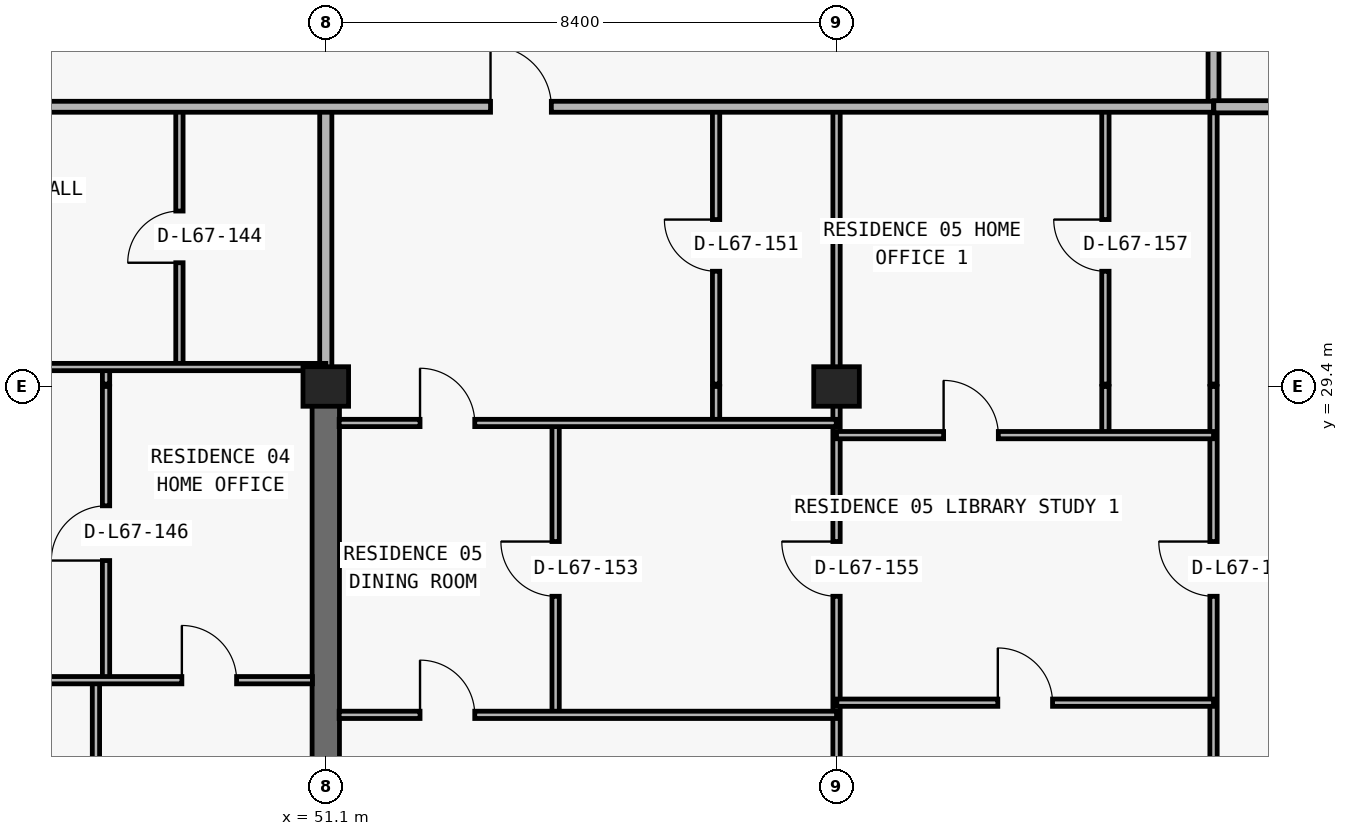
"""IFC4 building model, lengths in metres.
Left out: names, types, materials, properties, quantities, classifications, styles, units other than length and angle.
Written with IfcOpenShell. Run it as: python <this file> out.ifc"""

import sys

from ifc_helpers import new_model, si_unit, direction, frame, frame_2d, origin, origin_2d, place, context, subcontext, project, spatial, rectangle, extrude, element, fill, save


model = new_model("IFC4")
c1 = context("Model", 3, precision=1e-05, world=origin(), true_north=direction((0.0, 1.0)))
c2 = subcontext(c1, "Body", "Model", "MODEL_VIEW")
j1 = project(units=[si_unit("LENGTHUNIT", "METRE"), si_unit("PLANEANGLEUNIT", "RADIAN")], contexts=[c1])
p1 = place(None, origin())
s1 = spatial("IfcSite", under=j1, at=p1, CompositionType="ELEMENT")
p2 = place(p1, origin())
s2 = spatial("IfcBuilding", under=s1, at=p2, CompositionType="ELEMENT")
p3 = place(p2, frame((0.0, 0.0, 239.7)))
s3 = spatial("IfcBuildingStorey", under=s2, at=p3, CompositionType="ELEMENT", Elevation=239.7)
for number, where, z_axis, x_axis in (
    (1, (51.1, 29.4, 0.0), (0.0, 0.0, 1.0), (1.0, 0.0, 0.0)),
    (2, (59.5, 29.4, 0.0), (0.0, 0.0, 1.0), (1.0, 0.0, 0.0)),
):
    element("IfcColumn", number, at=place(p3, frame(where, z_axis=z_axis, x_axis=x_axis)), inside=s3, PredefinedType="COLUMN", context=c2, shape_type="SweptSolid", body=[
        extrude(rectangle(XDim=0.75, YDim=0.65, at=origin_2d()), origin(), (0.0, 0.0, 1.0), 3.05),
    ])
p4 = place(p3, frame((51.1, 20.8, 0.0), z_axis=(0.0, 0.0, 1.0), x_axis=(0.0, 1.0, 0.0)))
e3 = element("IfcWall", 3, at=p4, inside=s3, PredefinedType="SHEAR", context=c2, shape_type="SweptSolid", body=[
    extrude(rectangle(XDim=8.6, YDim=0.45, at=frame_2d((4.3, 0.0))), origin(), (0.0, 0.0, 1.0), 3.05),
])
p5 = place(p3, frame((47.32, 13.34, 0.0), z_axis=(0.0, 0.0, 1.0), x_axis=(0.0, 1.0, 0.0)))
e4 = element("IfcWall", 4, at=p5, inside=s3, PredefinedType="PARTITIONING", context=c2, shape_type="SweptSolid", body=[
    extrude(rectangle(XDim=11.23, YDim=0.12, at=frame_2d((5.615, 0.0))), origin(), (0.0, 0.0, 1.0), 3.05),
])
p6 = place(p3, frame((47.486, 24.575, 0.0), z_axis=(0.0, 0.0, 1.0), x_axis=(0.0, 1.0, 0.0)))
e5 = element("IfcWall", 5, at=p6, inside=s3, PredefinedType="PARTITIONING", context=c2, shape_type="SweptSolid", body=[
    extrude(rectangle(XDim=4.825, YDim=0.12, at=frame_2d((2.413, 0.0))), origin(), (0.0, 0.0, 1.0), 3.05),
])
p7 = place(p6, frame((1.962, 0.0, 0.0)))
e6 = element("IfcOpeningElement", 6, at=p7, cuts=e5, PredefinedType="OPENING", context=c2, shape_type="SweptSolid", body=[
    extrude(rectangle(XDim=0.9, YDim=2.15, at=frame_2d((0.45, 1.075))), frame((0.0, 0.07, 0.0), z_axis=(0.0, -1.0, 0.0), x_axis=(1.0, 0.0, 0.0)), (0.0, 0.0, 1.0), 0.14),
])
p8 = place(p3, frame((47.486, 29.44, 0.0), z_axis=(0.0, 0.0, 1.0), x_axis=(0.0, 1.0, 0.0)))
e7 = element("IfcWall", 7, at=p8, inside=s3, PredefinedType="PARTITIONING", context=c2, shape_type="SweptSolid", body=[
    extrude(rectangle(XDim=0.28, YDim=0.12, at=frame_2d((0.14, 0.0))), origin(), (0.0, 0.0, 1.0), 3.05),
])
p9 = place(p3, frame((48.693, 29.72, 0.0), z_axis=(0.0, 0.0, 1.0), x_axis=(0.0, 1.0, 0.0)))
e8 = element("IfcWall", 8, at=p9, inside=s3, PredefinedType="PARTITIONING", context=c2, shape_type="SweptSolid", body=[
    extrude(rectangle(XDim=4.28, YDim=0.12, at=frame_2d((2.14, 0.0))), origin(), (0.0, 0.0, 1.0), 3.05),
])
p10 = place(p9, frame((1.715, 0.0, 0.0)))
e9 = element("IfcOpeningElement", 9, at=p10, cuts=e8, PredefinedType="OPENING", context=c2, shape_type="SweptSolid", body=[
    extrude(rectangle(XDim=0.85, YDim=2.1, at=frame_2d((0.425, 1.05))), frame((0.0, 0.07, 0.0), z_axis=(0.0, -1.0, 0.0), x_axis=(1.0, 0.0, 0.0)), (0.0, 0.0, 1.0), 0.14),
])
p11 = place(p3, frame((51.1, 29.44, 0.0), z_axis=(0.0, 0.0, 1.0), x_axis=(0.0, 1.0, 0.0)))
e10 = element("IfcWall", 10, at=p11, inside=s3, PredefinedType="PARTITIONING", context=c2, shape_type="SweptSolid", body=[
    extrude(rectangle(XDim=4.56, YDim=0.2, at=frame_2d((2.28, 0.0))), origin(), (0.0, 0.0, 1.0), 2.335),
])
p12 = place(p3, frame((54.88, 24.0, 0.0), z_axis=(0.0, 0.0, 1.0), x_axis=(0.0, 1.0, 0.0)))
e11 = element("IfcWall", 11, at=p12, inside=s3, PredefinedType="PARTITIONING", context=c2, shape_type="SweptSolid", body=[
    extrude(rectangle(XDim=4.8, YDim=0.12, at=frame_2d((2.4, 0.0))), origin(), (0.0, 0.0, 1.0), 3.05),
])
p13 = place(p12, frame((1.95, 0.0, 0.0)))
e12 = element("IfcOpeningElement", 12, at=p13, cuts=e11, PredefinedType="OPENING", context=c2, shape_type="SweptSolid", body=[
    extrude(rectangle(XDim=0.9, YDim=2.15, at=frame_2d((0.45, 1.075))), frame((0.0, 0.07, 0.0), z_axis=(0.0, -1.0, 0.0), x_axis=(1.0, 0.0, 0.0)), (0.0, 0.0, 1.0), 0.14),
])
p14 = place(p3, frame((57.519, 28.8, 0.0), z_axis=(0.0, 0.0, 1.0), x_axis=(0.0, 1.0, 0.0)))
e13 = element("IfcWall", 13, at=p14, inside=s3, PredefinedType="PARTITIONING", context=c2, shape_type="SweptSolid", body=[
    extrude(rectangle(XDim=0.6, YDim=0.12, at=frame_2d((0.3, 0.0))), origin(), (0.0, 0.0, 1.0), 3.05),
])
p15 = place(p3, frame((57.519, 29.44, 0.0), z_axis=(0.0, 0.0, 1.0), x_axis=(0.0, 1.0, 0.0)))
e14 = element("IfcWall", 14, at=p15, inside=s3, PredefinedType="PARTITIONING", context=c2, shape_type="SweptSolid", body=[
    extrude(rectangle(XDim=4.56, YDim=0.12, at=frame_2d((2.28, 0.0))), origin(), (0.0, 0.0, 1.0), 3.05),
])
p16 = place(p15, frame((1.855, 0.0, 0.0)))
e15 = element("IfcOpeningElement", 15, at=p16, cuts=e14, PredefinedType="OPENING", context=c2, shape_type="SweptSolid", body=[
    extrude(rectangle(XDim=0.85, YDim=2.1, at=frame_2d((0.425, 1.05))), frame((0.0, 0.07, 0.0), z_axis=(0.0, -1.0, 0.0), x_axis=(1.0, 0.0, 0.0)), (0.0, 0.0, 1.0), 0.14),
])
p17 = place(p3, frame((59.5, 13.34, 0.0), z_axis=(0.0, 0.0, 1.0), x_axis=(0.0, 1.0, 0.0)))
e16 = element("IfcWall", 16, at=p17, inside=s3, PredefinedType="PARTITIONING", context=c2, shape_type="SweptSolid", body=[
    extrude(rectangle(XDim=16.06, YDim=0.12, at=frame_2d((8.03, 0.0))), origin(), (0.0, 0.0, 1.0), 2.263),
])
p18 = place(p17, frame((12.61, 0.0, 0.0)))
e17 = element("IfcOpeningElement", 17, at=p18, cuts=e16, PredefinedType="OPENING", context=c2, shape_type="SweptSolid", body=[
    extrude(rectangle(XDim=0.9, YDim=2.15, at=frame_2d((0.45, 1.075))), frame((0.0, 0.07, 0.0), z_axis=(0.0, -1.0, 0.0), x_axis=(1.0, 0.0, 0.0)), (0.0, 0.0, 1.0), 0.14),
])
p19 = place(p3, frame((59.5, 29.44, 0.0), z_axis=(0.0, 0.0, 1.0), x_axis=(0.0, 1.0, 0.0)))
e18 = element("IfcWall", 18, at=p19, inside=s3, PredefinedType="PARTITIONING", context=c2, shape_type="SweptSolid", body=[
    extrude(rectangle(XDim=4.56, YDim=0.12, at=frame_2d((2.28, 0.0))), origin(), (0.0, 0.0, 1.0), 2.263),
])
p20 = place(p3, frame((63.922, 28.6, 0.0), z_axis=(0.0, 0.0, 1.0), x_axis=(0.0, 1.0, 0.0)))
e19 = element("IfcWall", 19, at=p20, inside=s3, PredefinedType="PARTITIONING", context=c2, shape_type="SweptSolid", body=[
    extrude(rectangle(XDim=0.8, YDim=0.12, at=frame_2d((0.4, 0.0))), origin(), (0.0, 0.0, 1.0), 2.629),
])
p21 = place(p3, frame((63.922, 29.44, 0.0), z_axis=(0.0, 0.0, 1.0), x_axis=(0.0, 1.0, 0.0)))
e20 = element("IfcWall", 20, at=p21, inside=s3, PredefinedType="PARTITIONING", context=c2, shape_type="SweptSolid", body=[
    extrude(rectangle(XDim=4.56, YDim=0.12, at=frame_2d((2.28, 0.0))), origin(), (0.0, 0.0, 1.0), 2.629),
])
p22 = place(p21, frame((1.855, 0.0, 0.0)))
e21 = element("IfcOpeningElement", 21, at=p22, cuts=e20, PredefinedType="OPENING", context=c2, shape_type="SweptSolid", body=[
    extrude(rectangle(XDim=0.85, YDim=2.1, at=frame_2d((0.425, 1.05))), frame((0.0, 0.07, 0.0), z_axis=(0.0, -1.0, 0.0), x_axis=(1.0, 0.0, 0.0)), (0.0, 0.0, 1.0), 0.14),
])
p23 = place(p3, frame((65.7, 13.42, 0.0), z_axis=(0.0, 0.0, 1.0), x_axis=(0.0, 1.0, 0.0)))
e22 = element("IfcWall", 22, at=p23, inside=s3, PredefinedType="PARTITIONING", context=c2, shape_type="SweptSolid", body=[
    extrude(rectangle(XDim=15.98, YDim=0.12, at=frame_2d((7.99, 0.0))), origin(), (0.0, 0.0, 1.0), 3.05),
])
p24 = place(p23, frame((12.53, 0.0, 0.0)))
e23 = element("IfcOpeningElement", 23, at=p24, cuts=e22, PredefinedType="OPENING", context=c2, shape_type="SweptSolid", body=[
    extrude(rectangle(XDim=0.9, YDim=2.15, at=frame_2d((0.45, 1.075))), frame((0.0, 0.07, 0.0), z_axis=(0.0, -1.0, 0.0), x_axis=(1.0, 0.0, 0.0)), (0.0, 0.0, 1.0), 0.14),
])
p25 = place(p3, frame((65.7, 29.44, 0.0), z_axis=(0.0, 0.0, 1.0), x_axis=(0.0, 1.0, 0.0)))
e24 = element("IfcWall", 24, at=p25, inside=s3, PredefinedType="PARTITIONING", context=c2, shape_type="SweptSolid", body=[
    extrude(rectangle(XDim=4.56, YDim=0.12, at=frame_2d((2.28, 0.0))), origin(), (0.0, 0.0, 1.0), 3.05),
])
p26 = place(p3, frame((65.7, 34.005, 0.0), z_axis=(0.0, 0.0, 1.0), x_axis=(0.0, 1.0, 0.0)))
e25 = element("IfcWall", 25, at=p26, inside=s3, PredefinedType="PARTITIONING", context=c2, shape_type="SweptSolid", body=[
    extrude(rectangle(XDim=2.995, YDim=0.18, at=frame_2d((1.498, 0.0))), origin(), (0.0, 0.0, 1.0), 3.05),
])
p27 = place(p3, frame((51.32, 24.0, 0.0), z_axis=(0.0, 0.0, 1.0), x_axis=(1.0, 0.0, 0.0)))
e26 = element("IfcWall", 26, at=p27, inside=s3, PredefinedType="PARTITIONING", context=c2, shape_type="SweptSolid", body=[
    extrude(rectangle(XDim=8.18, YDim=0.12, at=frame_2d((4.09, 0.0))), origin(), (0.0, 0.0, 1.0), 3.05),
])
p28 = place(p27, frame((1.33, 0.0, 0.0)))
e27 = element("IfcOpeningElement", 27, at=p28, cuts=e26, PredefinedType="OPENING", context=c2, shape_type="SweptSolid", body=[
    extrude(rectangle(XDim=0.9, YDim=2.15, at=frame_2d((0.45, 1.075))), frame((0.0, 0.07, 0.0), z_axis=(0.0, -1.0, 0.0), x_axis=(1.0, 0.0, 0.0)), (0.0, 0.0, 1.0), 0.14),
])
p29 = place(p3, frame((59.505, 24.2, 0.0), z_axis=(0.0, 0.0, 1.0), x_axis=(1.0, 0.0, 0.0)))
e28 = element("IfcWall", 28, at=p29, inside=s3, PredefinedType="PARTITIONING", context=c2, shape_type="SweptSolid", body=[
    extrude(rectangle(XDim=6.195, YDim=0.12, at=frame_2d((3.098, 0.0))), origin(), (0.0, 0.0, 1.0), 3.05),
])
p30 = place(p29, frame((2.647, 0.0, 0.0)))
e29 = element("IfcOpeningElement", 29, at=p30, cuts=e28, PredefinedType="OPENING", context=c2, shape_type="SweptSolid", body=[
    extrude(rectangle(XDim=0.9, YDim=2.15, at=frame_2d((0.45, 1.075))), frame((0.0, 0.07, 0.0), z_axis=(0.0, -1.0, 0.0), x_axis=(1.0, 0.0, 0.0)), (0.0, 0.0, 1.0), 0.14),
])
p31 = place(p3, frame((42.7, 24.57, 0.0), z_axis=(0.0, 0.0, 1.0), x_axis=(1.0, 0.0, 0.0)))
e30 = element("IfcWall", 30, at=p31, inside=s3, PredefinedType="PARTITIONING", context=c2, shape_type="SweptSolid", body=[
    extrude(rectangle(XDim=8.18, YDim=0.12, at=frame_2d((4.09, 0.0))), origin(), (0.0, 0.0, 1.0), 3.05),
])
p32 = place(p31, frame((1.86, 0.0, 0.0)))
e31 = element("IfcOpeningElement", 31, at=p32, cuts=e30, PredefinedType="OPENING", context=c2, shape_type="SweptSolid", body=[
    extrude(rectangle(XDim=0.9, YDim=2.15, at=frame_2d((0.45, 1.075))), frame((0.0, 0.07, 0.0), z_axis=(0.0, -1.0, 0.0), x_axis=(1.0, 0.0, 0.0)), (0.0, 0.0, 1.0), 0.14),
])
p33 = place(p31, frame((6.033, 0.0, 0.0)))
e32 = element("IfcOpeningElement", 32, at=p33, cuts=e30, PredefinedType="OPENING", context=c2, shape_type="SweptSolid", body=[
    extrude(rectangle(XDim=0.9, YDim=2.15, at=frame_2d((0.45, 1.075))), frame((0.0, 0.07, 0.0), z_axis=(0.0, -1.0, 0.0), x_axis=(1.0, 0.0, 0.0)), (0.0, 0.0, 1.0), 0.14),
])
p34 = place(p3, frame((59.5, 28.6, 0.0), z_axis=(0.0, 0.0, 1.0), x_axis=(1.0, 0.0, 0.0)))
e33 = element("IfcWall", 33, at=p34, inside=s3, PredefinedType="PARTITIONING", context=c2, shape_type="SweptSolid", body=[
    extrude(rectangle(XDim=6.2, YDim=0.12, at=frame_2d((3.1, 0.0))), origin(), (0.0, 0.0, 1.0), 3.05),
])
p35 = place(p34, frame((1.761, 0.0, 0.0)))
e34 = element("IfcOpeningElement", 34, at=p35, cuts=e33, PredefinedType="OPENING", context=c2, shape_type="SweptSolid", body=[
    extrude(rectangle(XDim=0.9, YDim=2.15, at=frame_2d((0.45, 1.075))), frame((0.0, 0.07, 0.0), z_axis=(0.0, -1.0, 0.0), x_axis=(1.0, 0.0, 0.0)), (0.0, 0.0, 1.0), 0.14),
])
p36 = place(p3, frame((51.32, 28.8, 0.0), z_axis=(0.0, 0.0, 1.0), x_axis=(1.0, 0.0, 0.0)))
e35 = element("IfcWall", 35, at=p36, inside=s3, PredefinedType="PARTITIONING", context=c2, shape_type="SweptSolid", body=[
    extrude(rectangle(XDim=8.175, YDim=0.12, at=frame_2d((4.087, 0.0))), origin(), (0.0, 0.0, 1.0), 3.05),
])
p37 = place(p36, frame((1.33, 0.0, 0.0)))
e36 = element("IfcOpeningElement", 36, at=p37, cuts=e35, PredefinedType="OPENING", context=c2, shape_type="SweptSolid", body=[
    extrude(rectangle(XDim=0.9, YDim=2.15, at=frame_2d((0.45, 1.075))), frame((0.0, 0.07, 0.0), z_axis=(0.0, -1.0, 0.0), x_axis=(1.0, 0.0, 0.0)), (0.0, 0.0, 1.0), 0.14),
])
p38 = place(p3, frame((42.7, 29.72, 0.0), z_axis=(0.0, 0.0, 1.0), x_axis=(1.0, 0.0, 0.0)))
e37 = element("IfcWall", 37, at=p38, inside=s3, PredefinedType="PARTITIONING", context=c2, shape_type="SweptSolid", body=[
    extrude(rectangle(XDim=8.4, YDim=0.12, at=frame_2d((4.2, 0.0))), origin(), (0.0, 0.0, 1.0), 2.263),
])
p39 = place(p38, frame((1.943, 0.0, 0.0)))
e38 = element("IfcOpeningElement", 38, at=p39, cuts=e37, PredefinedType="OPENING", context=c2, shape_type="SweptSolid", body=[
    extrude(rectangle(XDim=0.9, YDim=2.15, at=frame_2d((0.45, 1.075))), frame((0.0, 0.07, 0.0), z_axis=(0.0, -1.0, 0.0), x_axis=(1.0, 0.0, 0.0)), (0.0, 0.0, 1.0), 0.14),
])
p40 = place(p3, frame((12.105, 34.0, 0.0), z_axis=(0.0, 0.0, 1.0), x_axis=(1.0, 0.0, 0.0)))
e39 = element("IfcWall", 39, at=p40, inside=s3, PredefinedType="PARTITIONING", context=c2, shape_type="SweptSolid", body=[
    extrude(rectangle(XDim=53.595, YDim=0.18, at=frame_2d((26.797, 0.0))), origin(), (0.0, 0.0, 1.0), 3.05),
])
p41 = place(p40, frame((1.607, 0.0, 0.0)))
e40 = element("IfcOpeningElement", 40, at=p41, cuts=e39, PredefinedType="OPENING", context=c2, shape_type="SweptSolid", body=[
    extrude(rectangle(XDim=1.0, YDim=2.2, at=frame_2d((0.5, 1.1))), frame((0.0, 0.1, 0.0), z_axis=(0.0, -1.0, 0.0), x_axis=(1.0, 0.0, 0.0)), (0.0, 0.0, 1.0), 0.2),
])
p42 = place(p40, frame((17.057, 0.0, 0.0)))
e41 = element("IfcOpeningElement", 41, at=p42, cuts=e39, PredefinedType="OPENING", context=c2, shape_type="SweptSolid", body=[
    extrude(rectangle(XDim=1.0, YDim=2.2, at=frame_2d((0.5, 1.1))), frame((0.0, 0.1, 0.0), z_axis=(0.0, -1.0, 0.0), x_axis=(1.0, 0.0, 0.0)), (0.0, 0.0, 1.0), 0.2),
])
p43 = place(p40, frame((25.242, 0.0, 0.0)))
e42 = element("IfcOpeningElement", 42, at=p43, cuts=e39, PredefinedType="OPENING", context=c2, shape_type="SweptSolid", body=[
    extrude(rectangle(XDim=1.0, YDim=2.2, at=frame_2d((0.5, 1.1))), frame((0.0, 0.1, 0.0), z_axis=(0.0, -1.0, 0.0), x_axis=(1.0, 0.0, 0.0)), (0.0, 0.0, 1.0), 0.2),
])
p44 = place(p40, frame((33.092, 0.0, 0.0)))
e43 = element("IfcOpeningElement", 43, at=p44, cuts=e39, PredefinedType="OPENING", context=c2, shape_type="SweptSolid", body=[
    extrude(rectangle(XDim=1.0, YDim=2.2, at=frame_2d((0.5, 1.1))), frame((0.0, 0.1, 0.0), z_axis=(0.0, -1.0, 0.0), x_axis=(1.0, 0.0, 0.0)), (0.0, 0.0, 1.0), 0.2),
])
p45 = place(p40, frame((41.705, 0.0, 0.0)))
e44 = element("IfcOpeningElement", 44, at=p45, cuts=e39, PredefinedType="OPENING", context=c2, shape_type="SweptSolid", body=[
    extrude(rectangle(XDim=1.0, YDim=2.2, at=frame_2d((0.5, 1.1))), frame((0.0, 0.1, 0.0), z_axis=(0.0, -1.0, 0.0), x_axis=(1.0, 0.0, 0.0)), (0.0, 0.0, 1.0), 0.2),
])
p46 = place(p3, frame((65.705, 34.0, 0.0), z_axis=(0.0, 0.0, 1.0), x_axis=(1.0, 0.0, 0.0)))
e45 = element("IfcWall", 45, at=p46, inside=s3, PredefinedType="PARTITIONING", context=c2, shape_type="SweptSolid", body=[
    extrude(rectangle(XDim=3.7, YDim=0.2, at=frame_2d((1.85, 0.0))), origin(), (0.0, 0.0, 1.0), 3.05),
])
p47 = place(p10, origin())
e46 = element("IfcDoor", 46, at=p47, inside=s3, OperationType="SINGLE_SWING_LEFT", PredefinedType="DOOR", context=c2, shape_type="SweptSolid", body=[
    extrude(rectangle(XDim=0.85, YDim=2.1, at=frame_2d((0.425, 1.05))), frame((0.0, 0.025, 0.0), z_axis=(0.0, -1.0, 0.0), x_axis=(1.0, 0.0, 0.0)), (0.0, 0.0, 1.0), 0.05),
])
fill(e9, e46)
p48 = place(p7, origin())
e47 = element("IfcDoor", 47, at=p48, inside=s3, OperationType="SINGLE_SWING_LEFT", PredefinedType="DOOR", context=c2, shape_type="SweptSolid", body=[
    extrude(rectangle(XDim=0.9, YDim=2.15, at=frame_2d((0.45, 1.075))), frame((0.0, 0.025, 0.0), z_axis=(0.0, -1.0, 0.0), x_axis=(1.0, 0.0, 0.0)), (0.0, 0.0, 1.0), 0.05),
])
fill(e6, e47)
p49 = place(p33, origin())
e48 = element("IfcDoor", 48, at=p49, inside=s3, OperationType="SINGLE_SWING_LEFT", PredefinedType="DOOR", context=c2, shape_type="SweptSolid", body=[
    extrude(rectangle(XDim=0.9, YDim=2.15, at=frame_2d((0.45, 1.075))), frame((0.0, 0.025, 0.0), z_axis=(0.0, -1.0, 0.0), x_axis=(1.0, 0.0, 0.0)), (0.0, 0.0, 1.0), 0.05),
])
fill(e32, e48)
p50 = place(p45, origin())
e49 = element("IfcDoor", 49, at=p50, inside=s3, OperationType="SINGLE_SWING_LEFT", PredefinedType="DOOR", context=c2, shape_type="SweptSolid", body=[
    extrude(rectangle(XDim=1.0, YDim=2.2, at=frame_2d((0.5, 1.1))), frame((0.0, 0.025, 0.0), z_axis=(0.0, -1.0, 0.0), x_axis=(1.0, 0.0, 0.0)), (0.0, 0.0, 1.0), 0.05),
])
fill(e44, e49)
p51 = place(p16, origin())
e50 = element("IfcDoor", 50, at=p51, inside=s3, OperationType="SINGLE_SWING_RIGHT", PredefinedType="DOOR", context=c2, shape_type="SweptSolid", body=[
    extrude(rectangle(XDim=0.85, YDim=2.1, at=frame_2d((0.425, 1.05))), frame((0.0, 0.025, 0.0), z_axis=(0.0, -1.0, 0.0), x_axis=(1.0, 0.0, 0.0)), (0.0, 0.0, 1.0), 0.05),
])
fill(e15, e50)
p52 = place(p37, origin())
e51 = element("IfcDoor", 51, at=p52, inside=s3, OperationType="SINGLE_SWING_LEFT", PredefinedType="DOOR", context=c2, shape_type="SweptSolid", body=[
    extrude(rectangle(XDim=0.9, YDim=2.15, at=frame_2d((0.45, 1.075))), frame((0.0, 0.025, 0.0), z_axis=(0.0, -1.0, 0.0), x_axis=(1.0, 0.0, 0.0)), (0.0, 0.0, 1.0), 0.05),
])
fill(e36, e51)
p53 = place(p13, origin())
e52 = element("IfcDoor", 52, at=p53, inside=s3, OperationType="SINGLE_SWING_RIGHT", PredefinedType="DOOR", context=c2, shape_type="SweptSolid", body=[
    extrude(rectangle(XDim=0.9, YDim=2.15, at=frame_2d((0.45, 1.075))), frame((0.0, 0.025, 0.0), z_axis=(0.0, -1.0, 0.0), x_axis=(1.0, 0.0, 0.0)), (0.0, 0.0, 1.0), 0.05),
])
fill(e12, e52)
p54 = place(p28, origin())
e53 = element("IfcDoor", 53, at=p54, inside=s3, OperationType="SINGLE_SWING_LEFT", PredefinedType="DOOR", context=c2, shape_type="SweptSolid", body=[
    extrude(rectangle(XDim=0.9, YDim=2.15, at=frame_2d((0.45, 1.075))), frame((0.0, 0.025, 0.0), z_axis=(0.0, -1.0, 0.0), x_axis=(1.0, 0.0, 0.0)), (0.0, 0.0, 1.0), 0.05),
])
fill(e27, e53)
p55 = place(p18, origin())
e54 = element("IfcDoor", 54, at=p55, inside=s3, OperationType="SINGLE_SWING_RIGHT", PredefinedType="DOOR", context=c2, shape_type="SweptSolid", body=[
    extrude(rectangle(XDim=0.9, YDim=2.15, at=frame_2d((0.45, 1.075))), frame((0.0, 0.025, 0.0), z_axis=(0.0, -1.0, 0.0), x_axis=(1.0, 0.0, 0.0)), (0.0, 0.0, 1.0), 0.05),
])
fill(e17, e54)
p56 = place(p35, origin())
e55 = element("IfcDoor", 55, at=p56, inside=s3, OperationType="SINGLE_SWING_LEFT", PredefinedType="DOOR", context=c2, shape_type="SweptSolid", body=[
    extrude(rectangle(XDim=0.9, YDim=2.15, at=frame_2d((0.45, 1.075))), frame((0.0, 0.025, 0.0), z_axis=(0.0, -1.0, 0.0), x_axis=(1.0, 0.0, 0.0)), (0.0, 0.0, 1.0), 0.05),
])
fill(e34, e55)
p57 = place(p22, origin())
e56 = element("IfcDoor", 56, at=p57, inside=s3, OperationType="SINGLE_SWING_RIGHT", PredefinedType="DOOR", context=c2, shape_type="SweptSolid", body=[
    extrude(rectangle(XDim=0.85, YDim=2.1, at=frame_2d((0.425, 1.05))), frame((0.0, 0.025, 0.0), z_axis=(0.0, -1.0, 0.0), x_axis=(1.0, 0.0, 0.0)), (0.0, 0.0, 1.0), 0.05),
])
fill(e21, e56)
p58 = place(p30, origin())
e57 = element("IfcDoor", 57, at=p58, inside=s3, OperationType="SINGLE_SWING_LEFT", PredefinedType="DOOR", context=c2, shape_type="SweptSolid", body=[
    extrude(rectangle(XDim=0.9, YDim=2.15, at=frame_2d((0.45, 1.075))), frame((0.0, 0.025, 0.0), z_axis=(0.0, -1.0, 0.0), x_axis=(1.0, 0.0, 0.0)), (0.0, 0.0, 1.0), 0.05),
])
fill(e29, e57)
p59 = place(p24, origin())
e58 = element("IfcDoor", 58, at=p59, inside=s3, OperationType="SINGLE_SWING_RIGHT", PredefinedType="DOOR", context=c2, shape_type="SweptSolid", body=[
    extrude(rectangle(XDim=0.9, YDim=2.15, at=frame_2d((0.45, 1.075))), frame((0.0, 0.025, 0.0), z_axis=(0.0, -1.0, 0.0), x_axis=(1.0, 0.0, 0.0)), (0.0, 0.0, 1.0), 0.05),
])
fill(e23, e58)
save(model, sys.argv[1])
